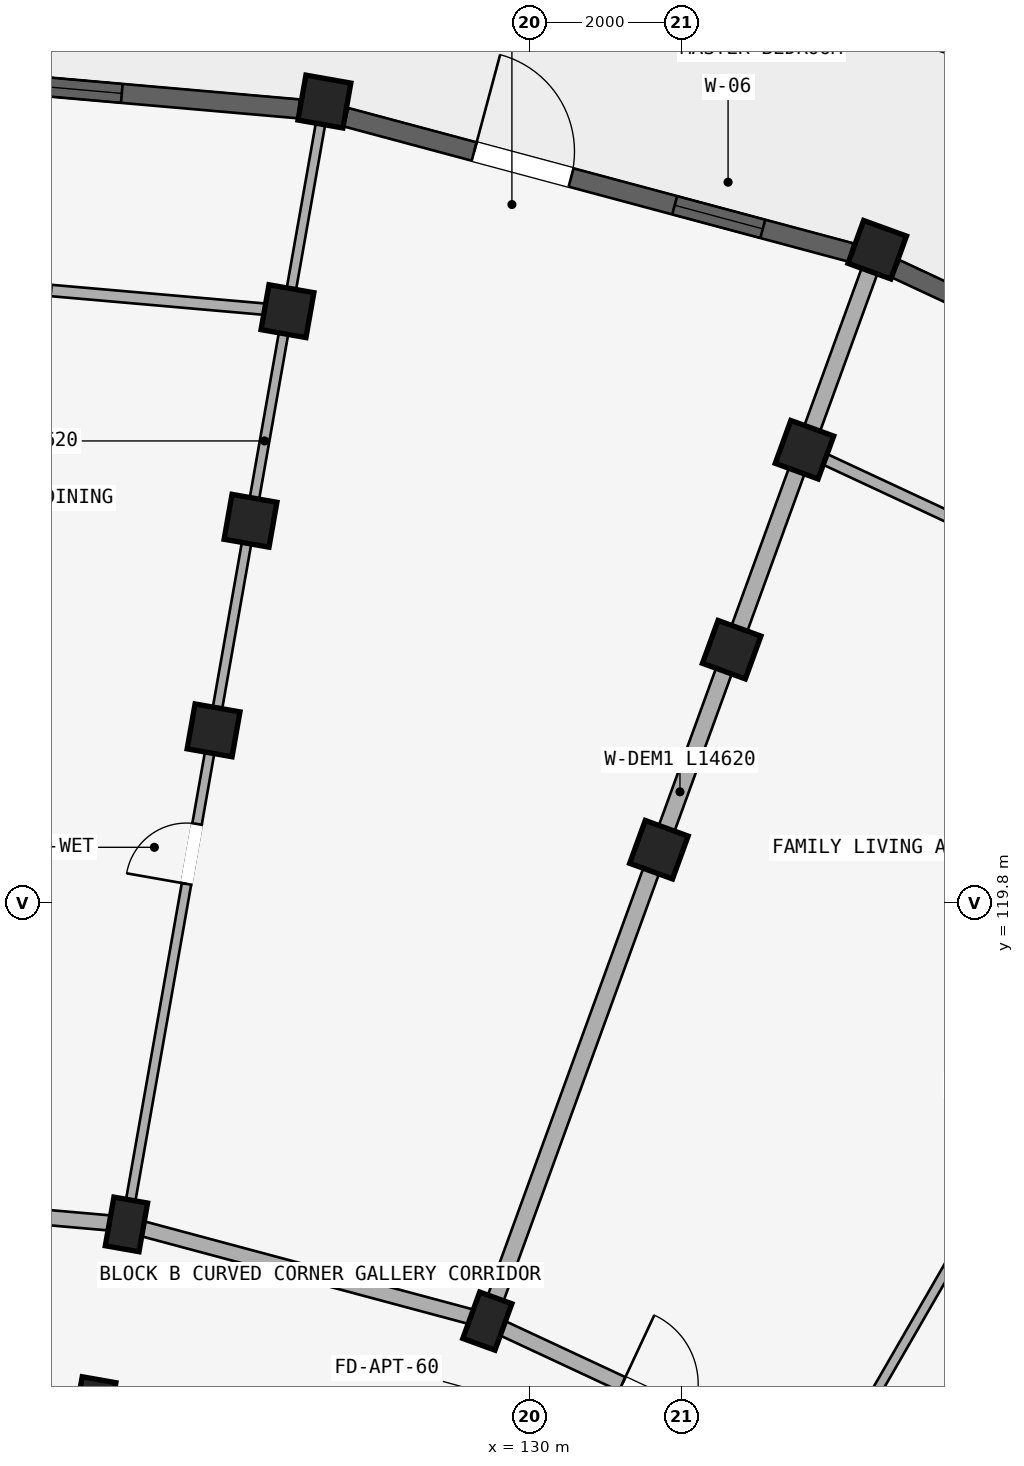
"""IFC4 building model, lengths in metres.
Left out: names, types, materials, properties, quantities, classifications, styles, units other than length and angle.
Written with IfcOpenShell. Run it as: python <this file> out.ifc"""

import sys

from ifc_helpers import new_model, si_unit, direction, frame, frame_2d, origin, origin_2d, place, context, subcontext, project, spatial, rectangle, extrude, element, fill, save


model = new_model("IFC4")
c1 = context("Model", 3, precision=1e-05, world=origin(), true_north=direction((0.0, 1.0)))
c2 = subcontext(c1, "Body", "Model", "MODEL_VIEW")
j1 = project(units=[si_unit("LENGTHUNIT", "METRE"), si_unit("PLANEANGLEUNIT", "RADIAN")], contexts=[c1])
p1 = place(None, origin())
s1 = spatial("IfcSite", under=j1, at=p1, CompositionType="ELEMENT")
p2 = place(p1, origin())
s2 = spatial("IfcBuilding", under=s1, at=p2, CompositionType="ELEMENT")
p3 = place(p2, frame((0.0, 0.0, 30.75)))
s3 = spatial("IfcBuildingStorey", under=s2, at=p3, CompositionType="ELEMENT", Elevation=30.75)
for number, where, z_axis, x_axis in (
    (1, (124.28, 113.208, 0.0), (0.0, 0.0, 1.0), (-0.985, 0.174, 0.0)),
    (2, (124.697, 115.572, 0.0), (0.0, 0.0, 1.0), (-0.985, 0.174, 0.0)),
):
    element("IfcColumn", number, at=place(p3, frame(where, z_axis=z_axis, x_axis=x_axis)), inside=s3, PredefinedType="COLUMN", context=c2, shape_type="SweptSolid", body=[
        extrude(rectangle(XDim=0.45, YDim=0.65, at=origin_2d()), origin(), (0.0, 0.0, 1.0), 2.93),
    ])
for number, where, z_axis, x_axis in (
    (3, (125.843, 122.071, 0.0), (0.0, 0.0, 1.0), (-0.985, 0.174, 0.0)),
    (4, (126.329, 124.829, 0.0), (0.0, 0.0, 1.0), (-0.985, 0.174, 0.0)),
    (5, (126.815, 127.586, 0.0), (0.0, 0.0, 1.0), (-0.985, 0.174, 0.0)),
):
    element("IfcColumn", number, at=place(p3, frame(where, z_axis=z_axis, x_axis=x_axis)), inside=s3, PredefinedType="COLUMN", context=c2, shape_type="SweptSolid", body=[
        extrude(rectangle(XDim=0.6, YDim=0.6, at=origin_2d()), origin(), (0.0, 0.0, 1.0), 2.93),
    ])
p4 = place(p3, frame((127.302, 130.344, 0.0), z_axis=(0.0, 0.0, 1.0), x_axis=(-0.984807753012, 0.173648177667, 0.0)))
e6 = element("IfcColumn", 6, at=p4, inside=s3, PredefinedType="COLUMN", context=c2, shape_type="SweptSolid", body=[
    extrude(rectangle(XDim=0.6, YDim=0.6, at=origin_2d()), origin(), (0.0, 0.0, 1.0), 2.97),
])
p5 = place(p3, frame((129.445, 114.299, 0.0), z_axis=(0.0, 0.0, 1.0), x_axis=(-0.939692620786, 0.342020143326, 0.0)))
e7 = element("IfcColumn", 7, at=p5, inside=s3, PredefinedType="COLUMN", context=c2, shape_type="SweptSolid", body=[
    extrude(rectangle(XDim=0.45, YDim=0.65, at=origin_2d()), origin(), (0.0, 0.0, 1.0), 2.93),
])
for number, where, z_axis, x_axis in (
    (8, (131.702, 120.501, 0.0), (0.0, 0.0, 1.0), (-0.94, 0.342, 0.0)),
    (9, (132.66, 123.132, 0.0), (0.0, 0.0, 1.0), (-0.94, 0.342, 0.0)),
    (10, (133.618, 125.764, 0.0), (0.0, 0.0, 1.0), (-0.94, 0.342, 0.0)),
):
    element("IfcColumn", number, at=place(p3, frame(where, z_axis=z_axis, x_axis=x_axis)), inside=s3, PredefinedType="COLUMN", context=c2, shape_type="SweptSolid", body=[
        extrude(rectangle(XDim=0.6, YDim=0.6, at=origin_2d()), origin(), (0.0, 0.0, 1.0), 2.93),
    ])
p6 = place(p3, frame((134.575, 128.395, 0.0), z_axis=(0.0, 0.0, 1.0), x_axis=(-0.939692620786, 0.342020143326, 0.0)))
e11 = element("IfcColumn", 11, at=p6, inside=s3, PredefinedType="COLUMN", context=c2, shape_type="SweptSolid", body=[
    extrude(rectangle(XDim=0.6, YDim=0.6, at=origin_2d()), origin(), (0.0, 0.0, 1.0), 2.97),
])
p7 = place(p3, frame((119.8, 113.6, 0.0), z_axis=(0.0, 0.0, 1.0), x_axis=(0.996191949488, -0.087187153726, 0.0)))
e12 = element("IfcWall", 12, at=p7, inside=s3, PredefinedType="STANDARD", context=c2, shape_type="SweptSolid", body=[
    extrude(rectangle(XDim=4.497, YDim=0.2, at=frame_2d((2.249, 0.0))), origin(), (0.0, 0.0, 1.0), 2.372),
])
p8 = place(p7, frame((1.729, 0.0, 0.0)))
e13 = element("IfcOpeningElement", 13, at=p8, cuts=e12, PredefinedType="OPENING", context=c2, shape_type="SweptSolid", body=[
    extrude(rectangle(XDim=1.04, YDim=2.15, at=frame_2d((0.52, 1.075))), frame((0.0, 0.11, 0.0), z_axis=(0.0, -1.0, 0.0), x_axis=(1.0, 0.0, 0.0)), (0.0, 0.0, 1.0), 0.22),
])
p9 = place(p3, frame((119.8, 116.0, 0.0), z_axis=(0.0, 0.0, 1.0), x_axis=(0.996193663584, -0.087167566415, 0.0)))
e14 = element("IfcWall", 14, at=p9, inside=s3, PredefinedType="STANDARD", context=c2, shape_type="SweptSolid", body=[
    extrude(rectangle(XDim=4.916, YDim=0.2, at=frame_2d((2.458, 0.0))), origin(), (0.0, 0.0, 1.0), 2.372),
])
p10 = place(p9, frame((1.888, 0.0, 0.0)))
e15 = element("IfcOpeningElement", 15, at=p10, cuts=e14, PredefinedType="OPENING", context=c2, shape_type="SweptSolid", body=[
    extrude(rectangle(XDim=1.14, YDim=2.15, at=frame_2d((0.57, 1.075))), frame((0.0, 0.11, 0.0), z_axis=(0.0, -1.0, 0.0), x_axis=(1.0, 0.0, 0.0)), (0.0, 0.0, 1.0), 0.22),
])
p11 = place(p3, frame((124.697, 115.572, 0.0), z_axis=(0.0, 0.0, 1.0), x_axis=(0.965930095386, -0.258803112091, 0.0)))
e16 = element("IfcWall", 16, at=p11, inside=s3, PredefinedType="STANDARD", context=c2, shape_type="SweptSolid", body=[
    extrude(rectangle(XDim=4.916, YDim=0.2, at=frame_2d((2.458, 0.0))), origin(), (0.0, 0.0, 1.0), 2.372),
])
p12 = place(p3, frame((129.445, 114.299, 0.0), z_axis=(0.0, 0.0, 1.0), x_axis=(0.906302381024, -0.422629854778, 0.0)))
e17 = element("IfcWall", 17, at=p12, inside=s3, PredefinedType="STANDARD", context=c2, shape_type="SweptSolid", body=[
    extrude(rectangle(XDim=4.915, YDim=0.2, at=frame_2d((2.458, 0.0))), origin(), (0.0, 0.0, 1.0), 2.372),
])
p13 = place(p12, frame((1.958, 0.0, 0.0)))
e18 = element("IfcOpeningElement", 18, at=p13, cuts=e17, PredefinedType="OPENING", context=c2, shape_type="SweptSolid", body=[
    extrude(rectangle(XDim=1.0, YDim=2.15, at=frame_2d((0.5, 1.075))), frame((0.0, 0.11, 0.0), z_axis=(0.0, -1.0, 0.0), x_axis=(1.0, 0.0, 0.0)), (0.0, 0.0, 1.0), 0.22),
])
p14 = place(p3, frame((124.714, 115.67, 0.0), z_axis=(0.0, 0.0, 1.0), x_axis=(0.173639577162, 0.984809269474, 0.0)))
e19 = element("IfcWall", 19, at=p14, inside=s3, PredefinedType="PARTITIONING", context=c2, shape_type="SweptSolid", body=[
    extrude(rectangle(XDim=14.62, YDim=0.125, at=frame_2d((7.31, 0.0))), origin(), (0.0, 0.0, 1.0), 2.372),
])
p15 = place(p14, frame((4.449, 0.0, 0.0)))
e20 = element("IfcOpeningElement", 20, at=p15, cuts=e19, PredefinedType="OPENING", context=c2, shape_type="SweptSolid", body=[
    extrude(rectangle(XDim=0.8, YDim=2.1, at=frame_2d((0.4, 1.05))), frame((0.0, 0.073, 0.0), z_axis=(0.0, -1.0, 0.0), x_axis=(1.0, 0.0, 0.0)), (0.0, 0.0, 1.0), 0.145),
])
p16 = place(p3, frame((129.479, 114.393, 0.0), z_axis=(0.0, 0.0, 1.0), x_axis=(0.342015232663, 0.939694408106, 0.0)))
e21 = element("IfcWall", 21, at=p16, inside=s3, PredefinedType="STANDARD", context=c2, shape_type="SweptSolid", body=[
    extrude(rectangle(XDim=14.62, YDim=0.22, at=frame_2d((7.31, 0.0))), origin(), (0.0, 0.0, 1.0), 2.372),
])
p17 = place(p3, frame((133.95, 112.309, 0.0), z_axis=(0.0, 0.0, 1.0), x_axis=(0.500007702989, 0.866020956416, 0.0)))
e22 = element("IfcWall", 22, at=p17, inside=s3, PredefinedType="PARTITIONING", context=c2, shape_type="SweptSolid", body=[
    extrude(rectangle(XDim=14.62, YDim=0.125, at=frame_2d((7.31, 0.0))), origin(), (0.0, 0.0, 1.0), 2.372),
])
p18 = place(p17, frame((4.449, 0.0, 0.0)))
e23 = element("IfcOpeningElement", 23, at=p18, cuts=e22, PredefinedType="OPENING", context=c2, shape_type="SweptSolid", body=[
    extrude(rectangle(XDim=0.8, YDim=2.1, at=frame_2d((0.4, 1.05))), frame((0.0, 0.073, 0.0), z_axis=(0.0, -1.0, 0.0), x_axis=(1.0, 0.0, 0.0)), (0.0, 0.0, 1.0), 0.145),
])
p19 = place(p3, frame((119.8, 128.2, 0.0), z_axis=(0.0, 0.0, 1.0), x_axis=(0.996194658198, -0.087156198737, 0.0)))
e24 = element("IfcWall", 24, at=p19, inside=s3, PredefinedType="PLUMBINGWALL", context=c2, shape_type="SweptSolid", body=[
    extrude(rectangle(XDim=7.042, YDim=0.15, at=frame_2d((3.521, 0.0))), origin(), (0.0, 0.0, 1.0), 2.372),
])
p20 = place(p19, frame((3.121, 0.0, 0.0)))
e25 = element("IfcOpeningElement", 25, at=p20, cuts=e24, PredefinedType="OPENING", context=c2, shape_type="SweptSolid", body=[
    extrude(rectangle(XDim=0.8, YDim=2.1, at=frame_2d((0.4, 1.05))), frame((0.0, 0.085, 0.0), z_axis=(0.0, -1.0, 0.0), x_axis=(1.0, 0.0, 0.0)), (0.0, 0.0, 1.0), 0.17),
])
p21 = place(p3, frame((133.618, 125.764, 0.0), z_axis=(0.0, 0.0, 1.0), x_axis=(0.906297360311, -0.422640621205, 0.0)))
e26 = element("IfcWall", 26, at=p21, inside=s3, PredefinedType="PLUMBINGWALL", context=c2, shape_type="SweptSolid", body=[
    extrude(rectangle(XDim=7.042, YDim=0.15, at=frame_2d((3.521, 0.0))), origin(), (0.0, 0.0, 1.0), 2.372),
])
p22 = place(p21, frame((3.141, 0.0, 0.0)))
e27 = element("IfcOpeningElement", 27, at=p22, cuts=e26, PredefinedType="OPENING", context=c2, shape_type="SweptSolid", body=[
    extrude(rectangle(XDim=0.76, YDim=2.05, at=frame_2d((0.38, 1.025))), frame((0.0, 0.085, 0.0), z_axis=(0.0, -1.0, 0.0), x_axis=(1.0, 0.0, 0.0)), (0.0, 0.0, 1.0), 0.17),
])
p23 = place(p3, frame((120.114, 130.847, 0.0), z_axis=(0.0, 0.0, 1.0), x_axis=(0.996193833065, -0.087165629485, 0.0)))
e28 = element("IfcWall", 28, at=p23, inside=s3, PredefinedType="STANDARD", context=c2, shape_type="SweptSolid", body=[
    extrude(rectangle(XDim=6.879, YDim=0.25, at=frame_2d((3.439, 0.0))), origin(), (0.0, 0.0, 1.0), 2.412),
])
p24 = place(p23, frame((2.34, 0.0, 0.312)))
e29 = element("IfcOpeningElement", 29, at=p24, cuts=e28, PredefinedType="OPENING", context=c2, shape_type="SweptSolid", body=[
    extrude(rectangle(XDim=2.2, YDim=1.9, at=frame_2d((1.1, 0.95))), frame((0.0, 0.135, 0.0), z_axis=(0.0, -1.0, 0.0), x_axis=(1.0, 0.0, 0.0)), (0.0, 0.0, 1.0), 0.27),
])
p25 = place(p3, frame((127.584, 130.139, 0.0), z_axis=(0.0, 0.0, 1.0), x_axis=(0.965921436109, -0.258835428922, 0.0)))
e30 = element("IfcWall", 30, at=p25, inside=s3, PredefinedType="STANDARD", context=c2, shape_type="SweptSolid", body=[
    extrude(rectangle(XDim=6.879, YDim=0.25, at=frame_2d((3.439, 0.0))), origin(), (0.0, 0.0, 1.0), 2.412),
])
p26 = place(p25, frame((4.479, 0.0, 0.462)))
e31 = element("IfcOpeningElement", 31, at=p26, cuts=e30, PredefinedType="OPENING", context=c2, shape_type="SweptSolid", body=[
    extrude(rectangle(XDim=1.2, YDim=1.5, at=frame_2d((0.6, 0.75))), frame((0.0, 0.135, 0.0), z_axis=(0.0, -1.0, 0.0), x_axis=(1.0, 0.0, 0.0)), (0.0, 0.0, 1.0), 0.27),
])
p27 = place(p25, frame((1.748, 0.0, 0.0)))
e32 = element("IfcOpeningElement", 32, at=p27, cuts=e30, PredefinedType="OPENING", context=c2, shape_type="SweptSolid", body=[
    extrude(rectangle(XDim=1.32, YDim=2.15, at=frame_2d((0.66, 1.075))), frame((0.0, 0.135, 0.0), z_axis=(0.0, -1.0, 0.0), x_axis=(1.0, 0.0, 0.0)), (0.0, 0.0, 1.0), 0.27),
])
p28 = place(p3, frame((134.818, 128.144, 0.0), z_axis=(0.0, 0.0, 1.0), x_axis=(0.906302789289, -0.422628979279, 0.0)))
e33 = element("IfcWall", 33, at=p28, inside=s3, PredefinedType="STANDARD", context=c2, shape_type="SweptSolid", body=[
    extrude(rectangle(XDim=6.879, YDim=0.25, at=frame_2d((3.439, 0.0))), origin(), (0.0, 0.0, 1.0), 2.412),
])
p29 = place(p28, frame((2.54, 0.0, 0.562)))
e34 = element("IfcOpeningElement", 34, at=p29, cuts=e33, PredefinedType="OPENING", context=c2, shape_type="SweptSolid", body=[
    extrude(rectangle(XDim=1.8, YDim=1.65, at=frame_2d((0.9, 0.825))), frame((0.0, 0.135, 0.0), z_axis=(0.0, -1.0, 0.0), x_axis=(1.0, 0.0, 0.0)), (0.0, 0.0, 1.0), 0.27),
])
p30 = place(p24, origin())
e35 = element("IfcWindow", 35, at=p30, inside=s3, PartitioningType="TRIPLE_PANEL_VERTICAL", PredefinedType="WINDOW", context=c2, shape_type="SweptSolid", body=[
    extrude(rectangle(XDim=2.2, YDim=1.9, at=frame_2d((1.1, 0.95))), frame((0.0, 0.03, 0.0), z_axis=(0.0, -1.0, 0.0), x_axis=(1.0, 0.0, 0.0)), (0.0, 0.0, 1.0), 0.06),
])
fill(e29, e35)
p31 = place(p26, origin())
e36 = element("IfcWindow", 36, at=p31, inside=s3, PartitioningType="SINGLE_PANEL", PredefinedType="WINDOW", context=c2, shape_type="SweptSolid", body=[
    extrude(rectangle(XDim=1.2, YDim=1.5, at=frame_2d((0.6, 0.75))), frame((0.0, 0.03, 0.0), z_axis=(0.0, -1.0, 0.0), x_axis=(1.0, 0.0, 0.0)), (0.0, 0.0, 1.0), 0.06),
])
fill(e31, e36)
p32 = place(p15, frame((0.8, 0.0, 0.0), z_axis=(0.0, 0.0, 1.0), x_axis=(-1.0, 0.0, 0.0)))
e37 = element("IfcDoor", 37, at=p32, inside=s3, OperationType="SINGLE_SWING_RIGHT", PredefinedType="DOOR", context=c2, shape_type="SweptSolid", body=[
    extrude(rectangle(XDim=0.8, YDim=2.1, at=frame_2d((0.4, 1.05))), frame((0.0, 0.025, 0.0), z_axis=(0.0, -1.0, 0.0), x_axis=(1.0, 0.0, 0.0)), (0.0, 0.0, 1.0), 0.05),
])
fill(e20, e37)
p33 = place(p13, origin())
e38 = element("IfcDoor", 38, at=p33, inside=s3, OperationType="SINGLE_SWING_LEFT", PredefinedType="DOOR", context=c2, shape_type="SweptSolid", body=[
    extrude(rectangle(XDim=1.0, YDim=2.15, at=frame_2d((0.5, 1.075))), frame((0.0, 0.025, 0.0), z_axis=(0.0, -1.0, 0.0), x_axis=(1.0, 0.0, 0.0)), (0.0, 0.0, 1.0), 0.05),
])
fill(e18, e38)
p34 = place(p27, origin())
e39 = element("IfcDoor", 39, at=p34, inside=s3, OperationType="SINGLE_SWING_LEFT", PredefinedType="DOOR", context=c2, shape_type="SweptSolid", body=[
    extrude(rectangle(XDim=1.32, YDim=2.15, at=frame_2d((0.66, 1.075))), frame((0.0, 0.025, 0.0), z_axis=(0.0, -1.0, 0.0), x_axis=(1.0, 0.0, 0.0)), (0.0, 0.0, 1.0), 0.05),
])
fill(e32, e39)
save(model, sys.argv[1])
